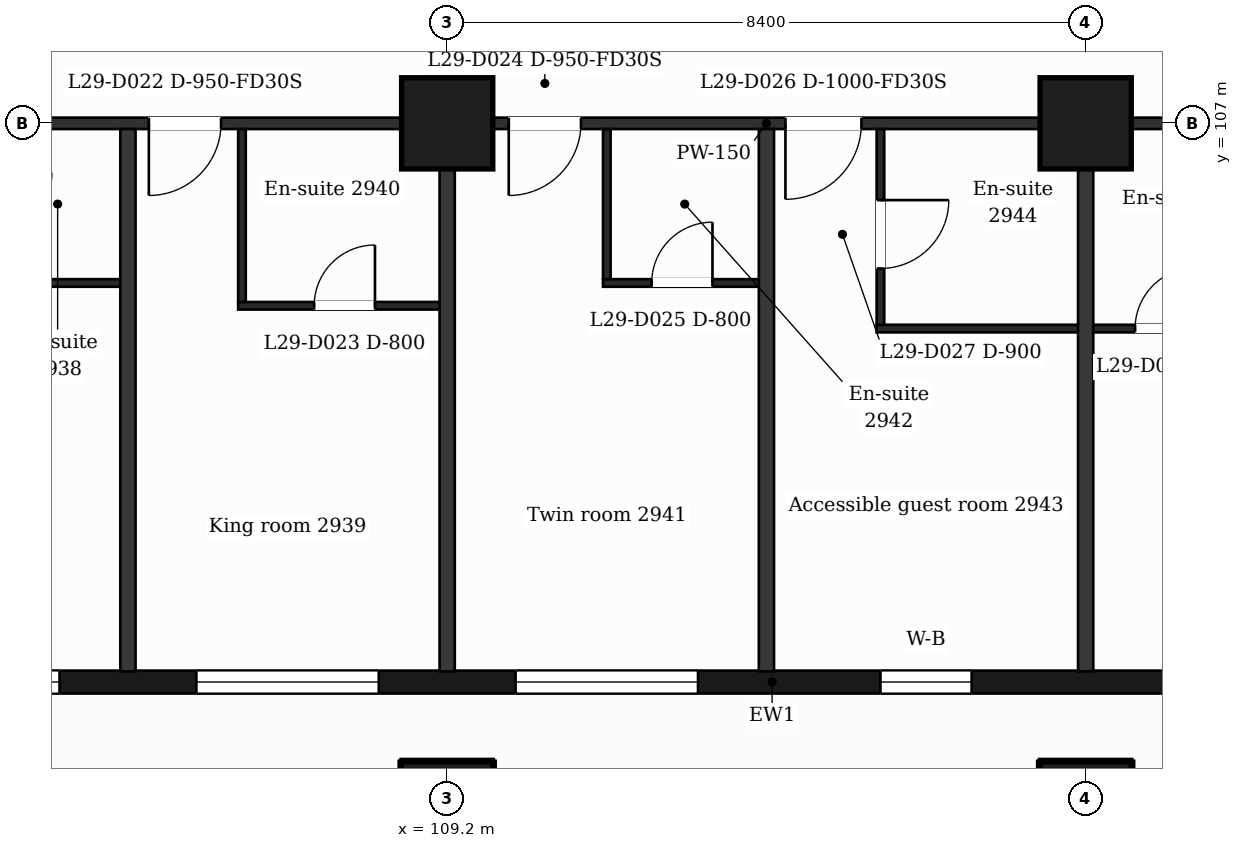
"""IFC4 building model, lengths in metres.
Left out: names, types, materials, properties, quantities, classifications, styles, units other than length and angle.
Written with IfcOpenShell. Run it as: python <this file> out.ifc"""

import sys

from ifc_helpers import new_model, si_unit, direction, frame, frame_2d, origin, origin_2d, place, context, subcontext, project, spatial, rectangle, extrude, element, fill, save


model = new_model("IFC4")
c1 = context("Model", 3, precision=1e-05, world=origin(), true_north=direction((0.0, 1.0)))
c2 = subcontext(c1, "Body", "Model", "MODEL_VIEW")
j1 = project(units=[si_unit("LENGTHUNIT", "METRE"), si_unit("PLANEANGLEUNIT", "RADIAN")], contexts=[c1])
p1 = place(None, origin())
s1 = spatial("IfcSite", under=j1, at=p1, CompositionType="ELEMENT")
p2 = place(p1, origin())
s2 = spatial("IfcBuilding", under=s1, at=p2, CompositionType="ELEMENT")
p3 = place(p2, frame((0.0, 0.0, 124.3)))
s3 = spatial("IfcBuildingStorey", under=s2, at=p3, CompositionType="ELEMENT", Elevation=124.3)
for number, where, z_axis, x_axis in (
    (1, (109.2, 98.0, 0.0), (0.0, 0.0, 1.0), (1.0, 0.0, 0.0)),
    (2, (117.6, 98.0, 0.0), (0.0, 0.0, 1.0), (1.0, 0.0, 0.0)),
    (3, (109.2, 107.0, 0.0), (0.0, 0.0, 1.0), (1.0, 0.0, 0.0)),
    (4, (117.6, 107.0, 0.0), (0.0, 0.0, 1.0), (1.0, 0.0, 0.0)),
):
    element("IfcColumn", number, at=place(p3, frame(where, z_axis=z_axis, x_axis=x_axis)), inside=s3, PredefinedType="COLUMN", context=c2, shape_type="SweptSolid", body=[
        extrude(rectangle(XDim=1.2, YDim=1.2, at=origin_2d()), origin(), (0.0, 0.0, 1.0), 3.7),
    ])
p4 = place(p3, frame((89.85, 99.65, 0.0), z_axis=(0.0, 0.0, 1.0), x_axis=(1.0, 0.0, 0.0)))
e5 = element("IfcWall", 5, at=p4, inside=s3, PredefinedType="SOLIDWALL", context=c2, shape_type="SweptSolid", body=[
    extrude(rectangle(XDim=47.25, YDim=0.3, at=frame_2d((23.625, 0.0))), origin(), (0.0, 0.0, 1.0), 3.38),
])
p5 = place(p4, frame((0.725, 0.0, 0.9)))
e6 = element("IfcOpeningElement", 6, at=p5, cuts=e5, PredefinedType="OPENING", context=c2, shape_type="SweptSolid", body=[
    extrude(rectangle(XDim=1.2, YDim=2.1, at=frame_2d((0.6, 1.05))), frame((0.0, 0.16, 0.0), z_axis=(0.0, -1.0, 0.0), x_axis=(1.0, 0.0, 0.0)), (0.0, 0.0, 1.0), 0.32),
])
p6 = place(p4, frame((3.45, 0.0, 0.9)))
e7 = element("IfcOpeningElement", 7, at=p6, cuts=e5, PredefinedType="OPENING", context=c2, shape_type="SweptSolid", body=[
    extrude(rectangle(XDim=2.4, YDim=2.1, at=frame_2d((1.2, 1.05))), frame((0.0, 0.16, 0.0), z_axis=(0.0, -1.0, 0.0), x_axis=(1.0, 0.0, 0.0)), (0.0, 0.0, 1.0), 0.32),
])
p7 = place(p4, frame((7.65, 0.0, 0.9)))
e8 = element("IfcOpeningElement", 8, at=p7, cuts=e5, PredefinedType="OPENING", context=c2, shape_type="SweptSolid", body=[
    extrude(rectangle(XDim=2.4, YDim=2.1, at=frame_2d((1.2, 1.05))), frame((0.0, 0.16, 0.0), z_axis=(0.0, -1.0, 0.0), x_axis=(1.0, 0.0, 0.0)), (0.0, 0.0, 1.0), 0.32),
])
p8 = place(p4, frame((11.85, 0.0, 0.9)))
e9 = element("IfcOpeningElement", 9, at=p8, cuts=e5, PredefinedType="OPENING", context=c2, shape_type="SweptSolid", body=[
    extrude(rectangle(XDim=2.4, YDim=2.1, at=frame_2d((1.2, 1.05))), frame((0.0, 0.16, 0.0), z_axis=(0.0, -1.0, 0.0), x_axis=(1.0, 0.0, 0.0)), (0.0, 0.0, 1.0), 0.32),
])
p9 = place(p4, frame((16.05, 0.0, 0.9)))
e10 = element("IfcOpeningElement", 10, at=p9, cuts=e5, PredefinedType="OPENING", context=c2, shape_type="SweptSolid", body=[
    extrude(rectangle(XDim=2.4, YDim=2.1, at=frame_2d((1.2, 1.05))), frame((0.0, 0.16, 0.0), z_axis=(0.0, -1.0, 0.0), x_axis=(1.0, 0.0, 0.0)), (0.0, 0.0, 1.0), 0.32),
])
p10 = place(p4, frame((20.25, 0.0, 0.9)))
e11 = element("IfcOpeningElement", 11, at=p10, cuts=e5, PredefinedType="OPENING", context=c2, shape_type="SweptSolid", body=[
    extrude(rectangle(XDim=2.4, YDim=2.1, at=frame_2d((1.2, 1.05))), frame((0.0, 0.16, 0.0), z_axis=(0.0, -1.0, 0.0), x_axis=(1.0, 0.0, 0.0)), (0.0, 0.0, 1.0), 0.32),
])
p11 = place(p4, frame((25.05, 0.0, 0.9)))
e12 = element("IfcOpeningElement", 12, at=p11, cuts=e5, PredefinedType="OPENING", context=c2, shape_type="SweptSolid", body=[
    extrude(rectangle(XDim=1.2, YDim=2.1, at=frame_2d((0.6, 1.05))), frame((0.0, 0.16, 0.0), z_axis=(0.0, -1.0, 0.0), x_axis=(1.0, 0.0, 0.0)), (0.0, 0.0, 1.0), 0.32),
])
p12 = place(p4, frame((29.25, 0.0, 0.9)))
e13 = element("IfcOpeningElement", 13, at=p12, cuts=e5, PredefinedType="OPENING", context=c2, shape_type="SweptSolid", body=[
    extrude(rectangle(XDim=1.2, YDim=2.1, at=frame_2d((0.6, 1.05))), frame((0.0, 0.16, 0.0), z_axis=(0.0, -1.0, 0.0), x_axis=(1.0, 0.0, 0.0)), (0.0, 0.0, 1.0), 0.32),
])
p13 = place(p4, frame((32.55, 0.0, 0.0)))
e14 = element("IfcOpeningElement", 14, at=p13, cuts=e5, PredefinedType="OPENING", context=c2, shape_type="SweptSolid", body=[
    extrude(rectangle(XDim=1.2, YDim=2.4, at=frame_2d((0.6, 1.2))), frame((0.0, 0.16, 0.0), z_axis=(0.0, -1.0, 0.0), x_axis=(1.0, 0.0, 0.0)), (0.0, 0.0, 1.0), 0.32),
])
p14 = place(p4, frame((34.35, 0.0, 0.9)))
e15 = element("IfcOpeningElement", 15, at=p14, cuts=e5, PredefinedType="OPENING", context=c2, shape_type="SweptSolid", body=[
    extrude(rectangle(XDim=1.2, YDim=2.1, at=frame_2d((0.6, 1.05))), frame((0.0, 0.16, 0.0), z_axis=(0.0, -1.0, 0.0), x_axis=(1.0, 0.0, 0.0)), (0.0, 0.0, 1.0), 0.32),
])
p15 = place(p4, frame((37.05, 0.0, 0.9)))
e16 = element("IfcOpeningElement", 16, at=p15, cuts=e5, PredefinedType="OPENING", context=c2, shape_type="SweptSolid", body=[
    extrude(rectangle(XDim=2.4, YDim=2.1, at=frame_2d((1.2, 1.05))), frame((0.0, 0.16, 0.0), z_axis=(0.0, -1.0, 0.0), x_axis=(1.0, 0.0, 0.0)), (0.0, 0.0, 1.0), 0.32),
])
p16 = place(p4, frame((40.95, 0.0, 0.0)))
e17 = element("IfcOpeningElement", 17, at=p16, cuts=e5, PredefinedType="OPENING", context=c2, shape_type="SweptSolid", body=[
    extrude(rectangle(XDim=1.2, YDim=2.4, at=frame_2d((0.6, 1.2))), frame((0.0, 0.16, 0.0), z_axis=(0.0, -1.0, 0.0), x_axis=(1.0, 0.0, 0.0)), (0.0, 0.0, 1.0), 0.32),
])
p17 = place(p4, frame((42.75, 0.0, 0.9)))
e18 = element("IfcOpeningElement", 18, at=p17, cuts=e5, PredefinedType="OPENING", context=c2, shape_type="SweptSolid", body=[
    extrude(rectangle(XDim=1.2, YDim=2.1, at=frame_2d((0.6, 1.05))), frame((0.0, 0.16, 0.0), z_axis=(0.0, -1.0, 0.0), x_axis=(1.0, 0.0, 0.0)), (0.0, 0.0, 1.0), 0.32),
])
p18 = place(p4, frame((45.25, 0.0, 0.9)))
e19 = element("IfcOpeningElement", 19, at=p18, cuts=e5, PredefinedType="OPENING", context=c2, shape_type="SweptSolid", body=[
    extrude(rectangle(XDim=1.2, YDim=2.1, at=frame_2d((0.6, 1.05))), frame((0.0, 0.16, 0.0), z_axis=(0.0, -1.0, 0.0), x_axis=(1.0, 0.0, 0.0)), (0.0, 0.0, 1.0), 0.32),
])
p19 = place(p3, frame((114.85, 104.3, 0.0), z_axis=(0.0, 0.0, 1.0), x_axis=(1.0, 0.0, 0.0)))
e20 = element("IfcWall", 20, at=p19, inside=s3, PredefinedType="PARTITIONING", context=c2, shape_type="SweptSolid", body=[
    extrude(rectangle(XDim=5.5, YDim=0.1, at=frame_2d((2.75, 0.0))), origin(), (0.0, 0.0, 1.0), 3.38),
])
p20 = place(p19, frame((3.4, 0.0, 0.0)))
e21 = element("IfcOpeningElement", 21, at=p20, cuts=e20, PredefinedType="OPENING", context=c2, shape_type="SweptSolid", body=[
    extrude(rectangle(XDim=0.8, YDim=2.1, at=frame_2d((0.4, 1.05))), frame((0.0, 0.06, 0.0), z_axis=(0.0, -1.0, 0.0), x_axis=(1.0, 0.0, 0.0)), (0.0, 0.0, 1.0), 0.12),
])
p21 = place(p3, frame((106.45, 104.6, 0.0), z_axis=(0.0, 0.0, 1.0), x_axis=(1.0, 0.0, 0.0)))
e22 = element("IfcWall", 22, at=p21, inside=s3, PredefinedType="PARTITIONING", context=c2, shape_type="SweptSolid", body=[
    extrude(rectangle(XDim=2.75, YDim=0.1, at=frame_2d((1.375, 0.0))), origin(), (0.0, 0.0, 1.0), 3.38),
])
p22 = place(p21, frame((1.0, 0.0, 0.0)))
e23 = element("IfcOpeningElement", 23, at=p22, cuts=e22, PredefinedType="OPENING", context=c2, shape_type="SweptSolid", body=[
    extrude(rectangle(XDim=0.8, YDim=2.1, at=frame_2d((0.4, 1.05))), frame((0.0, 0.06, 0.0), z_axis=(0.0, -1.0, 0.0), x_axis=(1.0, 0.0, 0.0)), (0.0, 0.0, 1.0), 0.12),
])
p23 = place(p3, frame((103.15, 104.9, 0.0), z_axis=(0.0, 0.0, 1.0), x_axis=(1.0, 0.0, 0.0)))
e24 = element("IfcWall", 24, at=p23, inside=s3, PredefinedType="PARTITIONING", context=c2, shape_type="SweptSolid", body=[
    extrude(rectangle(XDim=1.85, YDim=0.1, at=frame_2d((0.925, 0.0))), origin(), (0.0, 0.0, 1.0), 3.38),
])
p24 = place(p3, frame((111.25, 104.9, 0.0), z_axis=(0.0, 0.0, 1.0), x_axis=(1.0, 0.0, 0.0)))
e25 = element("IfcWall", 25, at=p24, inside=s3, PredefinedType="PARTITIONING", context=c2, shape_type="SweptSolid", body=[
    extrude(rectangle(XDim=2.15, YDim=0.1, at=frame_2d((1.075, 0.0))), origin(), (0.0, 0.0, 1.0), 3.38),
])
p25 = place(p24, frame((0.64, 0.0, 0.0)))
e26 = element("IfcOpeningElement", 26, at=p25, cuts=e25, PredefinedType="OPENING", context=c2, shape_type="SweptSolid", body=[
    extrude(rectangle(XDim=0.8, YDim=2.1, at=frame_2d((0.4, 1.05))), frame((0.0, 0.06, 0.0), z_axis=(0.0, -1.0, 0.0), x_axis=(1.0, 0.0, 0.0)), (0.0, 0.0, 1.0), 0.12),
])
p26 = place(p3, frame((87.018, 107.0, 0.0), z_axis=(0.0, 0.0, 1.0), x_axis=(1.0, 0.0, 0.0)))
e27 = element("IfcWall", 27, at=p26, inside=s3, PredefinedType="PARTITIONING", context=c2, shape_type="SweptSolid", body=[
    extrude(rectangle(XDim=52.765, YDim=0.15, at=frame_2d((26.382, 0.0))), origin(), (0.0, 0.0, 1.0), 3.38),
])
p27 = place(p26, frame((1.276, 0.0, 0.0)))
e28 = element("IfcOpeningElement", 28, at=p27, cuts=e27, PredefinedType="OPENING", context=c2, shape_type="SweptSolid", body=[
    extrude(rectangle(XDim=0.95, YDim=2.1, at=frame_2d((0.475, 1.05))), frame((0.0, 0.085, 0.0), z_axis=(0.0, -1.0, 0.0), x_axis=(1.0, 0.0, 0.0)), (0.0, 0.0, 1.0), 0.17),
])
p28 = place(p26, frame((6.192, 0.0, 0.0)))
e29 = element("IfcOpeningElement", 29, at=p28, cuts=e27, PredefinedType="OPENING", context=c2, shape_type="SweptSolid", body=[
    extrude(rectangle(XDim=0.95, YDim=2.1, at=frame_2d((0.475, 1.05))), frame((0.0, 0.085, 0.0), z_axis=(0.0, -1.0, 0.0), x_axis=(1.0, 0.0, 0.0)), (0.0, 0.0, 1.0), 0.17),
])
p29 = place(p26, frame((11.982, 0.0, 0.0)))
e30 = element("IfcOpeningElement", 30, at=p29, cuts=e27, PredefinedType="OPENING", context=c2, shape_type="SweptSolid", body=[
    extrude(rectangle(XDim=1.0, YDim=2.1, at=frame_2d((0.5, 1.05))), frame((0.0, 0.085, 0.0), z_axis=(0.0, -1.0, 0.0), x_axis=(1.0, 0.0, 0.0)), (0.0, 0.0, 1.0), 0.17),
])
p30 = place(p26, frame((14.582, 0.0, 0.0)))
e31 = element("IfcOpeningElement", 31, at=p30, cuts=e27, PredefinedType="OPENING", context=c2, shape_type="SweptSolid", body=[
    extrude(rectangle(XDim=0.95, YDim=2.1, at=frame_2d((0.475, 1.05))), frame((0.0, 0.085, 0.0), z_axis=(0.0, -1.0, 0.0), x_axis=(1.0, 0.0, 0.0)), (0.0, 0.0, 1.0), 0.17),
])
p31 = place(p26, frame((18.257, 0.0, 0.0)))
e32 = element("IfcOpeningElement", 32, at=p31, cuts=e27, PredefinedType="OPENING", context=c2, shape_type="SweptSolid", body=[
    extrude(rectangle(XDim=0.95, YDim=2.1, at=frame_2d((0.475, 1.05))), frame((0.0, 0.085, 0.0), z_axis=(0.0, -1.0, 0.0), x_axis=(1.0, 0.0, 0.0)), (0.0, 0.0, 1.0), 0.17),
])
p32 = place(p26, frame((22.992, 0.0, 0.0)))
e33 = element("IfcOpeningElement", 33, at=p32, cuts=e27, PredefinedType="OPENING", context=c2, shape_type="SweptSolid", body=[
    extrude(rectangle(XDim=0.95, YDim=2.1, at=frame_2d((0.475, 1.05))), frame((0.0, 0.085, 0.0), z_axis=(0.0, -1.0, 0.0), x_axis=(1.0, 0.0, 0.0)), (0.0, 0.0, 1.0), 0.17),
])
p33 = place(p26, frame((26.632, 0.0, 0.0)))
e34 = element("IfcOpeningElement", 34, at=p33, cuts=e27, PredefinedType="OPENING", context=c2, shape_type="SweptSolid", body=[
    extrude(rectangle(XDim=1.0, YDim=2.1, at=frame_2d((0.5, 1.05))), frame((0.0, 0.085, 0.0), z_axis=(0.0, -1.0, 0.0), x_axis=(1.0, 0.0, 0.0)), (0.0, 0.0, 1.0), 0.17),
])
p34 = place(p26, frame((33.557, 0.0, 0.0)))
e35 = element("IfcOpeningElement", 35, at=p34, cuts=e27, PredefinedType="OPENING", context=c2, shape_type="SweptSolid", body=[
    extrude(rectangle(XDim=0.95, YDim=2.1, at=frame_2d((0.475, 1.05))), frame((0.0, 0.085, 0.0), z_axis=(0.0, -1.0, 0.0), x_axis=(1.0, 0.0, 0.0)), (0.0, 0.0, 1.0), 0.17),
])
p35 = place(p26, frame((37.182, 0.0, 0.0)))
e36 = element("IfcOpeningElement", 36, at=p35, cuts=e27, PredefinedType="OPENING", context=c2, shape_type="SweptSolid", body=[
    extrude(rectangle(XDim=0.95, YDim=2.1, at=frame_2d((0.475, 1.05))), frame((0.0, 0.085, 0.0), z_axis=(0.0, -1.0, 0.0), x_axis=(1.0, 0.0, 0.0)), (0.0, 0.0, 1.0), 0.17),
])
p36 = place(p26, frame((41.957, 0.0, 0.0)))
e37 = element("IfcOpeningElement", 37, at=p36, cuts=e27, PredefinedType="OPENING", context=c2, shape_type="SweptSolid", body=[
    extrude(rectangle(XDim=0.95, YDim=2.1, at=frame_2d((0.475, 1.05))), frame((0.0, 0.085, 0.0), z_axis=(0.0, -1.0, 0.0), x_axis=(1.0, 0.0, 0.0)), (0.0, 0.0, 1.0), 0.17),
])
p37 = place(p26, frame((45.622, 0.0, 0.0)))
e38 = element("IfcOpeningElement", 38, at=p37, cuts=e27, PredefinedType="OPENING", context=c2, shape_type="SweptSolid", body=[
    extrude(rectangle(XDim=0.95, YDim=2.1, at=frame_2d((0.475, 1.05))), frame((0.0, 0.085, 0.0), z_axis=(0.0, -1.0, 0.0), x_axis=(1.0, 0.0, 0.0)), (0.0, 0.0, 1.0), 0.17),
])
p38 = place(p26, frame((48.56, 0.0, 0.0)))
e39 = element("IfcOpeningElement", 39, at=p38, cuts=e27, PredefinedType="OPENING", context=c2, shape_type="SweptSolid", body=[
    extrude(rectangle(XDim=0.95, YDim=2.1, at=frame_2d((0.475, 1.05))), frame((0.0, 0.085, 0.0), z_axis=(0.0, -1.0, 0.0), x_axis=(1.0, 0.0, 0.0)), (0.0, 0.0, 1.0), 0.17),
])
p39 = place(p3, frame((105.0, 99.79, 0.0), z_axis=(0.0, 0.0, 1.0), x_axis=(0.0, 1.0, 0.0)))
e40 = element("IfcWall", 40, at=p39, inside=s3, PredefinedType="PARTITIONING", context=c2, shape_type="SweptSolid", body=[
    extrude(rectangle(XDim=7.135, YDim=0.2, at=frame_2d((3.567, 0.0))), origin(), (0.0, 0.0, 1.0), 3.38),
])
p40 = place(p3, frame((106.5, 104.65, 0.0), z_axis=(0.0, 0.0, 1.0), x_axis=(0.0, 1.0, 0.0)))
e41 = element("IfcWall", 41, at=p40, inside=s3, PredefinedType="PARTITIONING", context=c2, shape_type="SweptSolid", body=[
    extrude(rectangle(XDim=2.275, YDim=0.1, at=frame_2d((1.138, 0.0))), origin(), (0.0, 0.0, 1.0), 3.38),
])
p41 = place(p3, frame((109.2, 99.79, 0.0), z_axis=(0.0, 0.0, 1.0), x_axis=(0.0, 1.0, 0.0)))
e42 = element("IfcWall", 42, at=p41, inside=s3, PredefinedType="PARTITIONING", context=c2, shape_type="SweptSolid", body=[
    extrude(rectangle(XDim=7.135, YDim=0.2, at=frame_2d((3.567, 0.0))), origin(), (0.0, 0.0, 1.0), 3.38),
])
p42 = place(p3, frame((111.3, 104.95, 0.0), z_axis=(0.0, 0.0, 1.0), x_axis=(0.0, 1.0, 0.0)))
e43 = element("IfcWall", 43, at=p42, inside=s3, PredefinedType="PARTITIONING", context=c2, shape_type="SweptSolid", body=[
    extrude(rectangle(XDim=1.975, YDim=0.1, at=frame_2d((0.988, 0.0))), origin(), (0.0, 0.0, 1.0), 3.38),
])
p43 = place(p3, frame((113.4, 99.79, 0.0), z_axis=(0.0, 0.0, 1.0), x_axis=(0.0, 1.0, 0.0)))
e44 = element("IfcWall", 44, at=p43, inside=s3, PredefinedType="PARTITIONING", context=c2, shape_type="SweptSolid", body=[
    extrude(rectangle(XDim=7.135, YDim=0.2, at=frame_2d((3.567, 0.0))), origin(), (0.0, 0.0, 1.0), 3.38),
])
p44 = place(p3, frame((114.9, 104.35, 0.0), z_axis=(0.0, 0.0, 1.0), x_axis=(0.0, 1.0, 0.0)))
e45 = element("IfcWall", 45, at=p44, inside=s3, PredefinedType="PARTITIONING", context=c2, shape_type="SweptSolid", body=[
    extrude(rectangle(XDim=2.575, YDim=0.1, at=frame_2d((1.288, 0.0))), origin(), (0.0, 0.0, 1.0), 3.38),
])
p45 = place(p44, frame((0.74, 0.0, 0.0)))
e46 = element("IfcOpeningElement", 46, at=p45, cuts=e45, PredefinedType="OPENING", context=c2, shape_type="SweptSolid", body=[
    extrude(rectangle(XDim=0.9, YDim=2.1, at=frame_2d((0.45, 1.05))), frame((0.0, 0.06, 0.0), z_axis=(0.0, -1.0, 0.0), x_axis=(1.0, 0.0, 0.0)), (0.0, 0.0, 1.0), 0.12),
])
p46 = place(p3, frame((117.6, 99.79, 0.0), z_axis=(0.0, 0.0, 1.0), x_axis=(0.0, 1.0, 0.0)))
e47 = element("IfcWall", 47, at=p46, inside=s3, PredefinedType="PARTITIONING", context=c2, shape_type="SweptSolid", body=[
    extrude(rectangle(XDim=7.135, YDim=0.2, at=frame_2d((3.567, 0.0))), origin(), (0.0, 0.0, 1.0), 3.38),
])
p47 = place(p8, origin())
e48 = element("IfcWindow", 48, at=p47, inside=s3, PartitioningType="SINGLE_PANEL", PredefinedType="WINDOW", context=c2, shape_type="SweptSolid", body=[
    extrude(rectangle(XDim=2.4, YDim=2.1, at=frame_2d((1.2, 1.05))), frame((0.0, 0.03, 0.0), z_axis=(0.0, -1.0, 0.0), x_axis=(1.0, 0.0, 0.0)), (0.0, 0.0, 1.0), 0.06),
])
fill(e9, e48)
p48 = place(p9, origin())
e49 = element("IfcWindow", 49, at=p48, inside=s3, PartitioningType="SINGLE_PANEL", PredefinedType="WINDOW", context=c2, shape_type="SweptSolid", body=[
    extrude(rectangle(XDim=2.4, YDim=2.1, at=frame_2d((1.2, 1.05))), frame((0.0, 0.03, 0.0), z_axis=(0.0, -1.0, 0.0), x_axis=(1.0, 0.0, 0.0)), (0.0, 0.0, 1.0), 0.06),
])
fill(e10, e49)
p49 = place(p10, origin())
e50 = element("IfcWindow", 50, at=p49, inside=s3, PartitioningType="SINGLE_PANEL", PredefinedType="WINDOW", context=c2, shape_type="SweptSolid", body=[
    extrude(rectangle(XDim=2.4, YDim=2.1, at=frame_2d((1.2, 1.05))), frame((0.0, 0.03, 0.0), z_axis=(0.0, -1.0, 0.0), x_axis=(1.0, 0.0, 0.0)), (0.0, 0.0, 1.0), 0.06),
])
fill(e11, e50)
p50 = place(p11, origin())
e51 = element("IfcWindow", 51, at=p50, inside=s3, PartitioningType="SINGLE_PANEL", PredefinedType="WINDOW", context=c2, shape_type="SweptSolid", body=[
    extrude(rectangle(XDim=1.2, YDim=2.1, at=frame_2d((0.6, 1.05))), frame((0.0, 0.03, 0.0), z_axis=(0.0, -1.0, 0.0), x_axis=(1.0, 0.0, 0.0)), (0.0, 0.0, 1.0), 0.06),
])
fill(e12, e51)
p51 = place(p31, origin())
e52 = element("IfcDoor", 52, at=p51, inside=s3, OperationType="SINGLE_SWING_LEFT", PredefinedType="DOOR", context=c2, shape_type="SweptSolid", body=[
    extrude(rectangle(XDim=0.95, YDim=2.1, at=frame_2d((0.475, 1.05))), frame((0.0, 0.025, 0.0), z_axis=(0.0, -1.0, 0.0), x_axis=(1.0, 0.0, 0.0)), (0.0, 0.0, 1.0), 0.05),
])
fill(e32, e52)
p52 = place(p22, origin())
e53 = element("IfcDoor", 53, at=p52, inside=s3, OperationType="SINGLE_SWING_RIGHT", PredefinedType="DOOR", context=c2, shape_type="SweptSolid", body=[
    extrude(rectangle(XDim=0.8, YDim=2.1, at=frame_2d((0.4, 1.05))), frame((0.0, 0.025, 0.0), z_axis=(0.0, -1.0, 0.0), x_axis=(1.0, 0.0, 0.0)), (0.0, 0.0, 1.0), 0.05),
])
fill(e23, e53)
p53 = place(p32, origin())
e54 = element("IfcDoor", 54, at=p53, inside=s3, OperationType="SINGLE_SWING_LEFT", PredefinedType="DOOR", context=c2, shape_type="SweptSolid", body=[
    extrude(rectangle(XDim=0.95, YDim=2.1, at=frame_2d((0.475, 1.05))), frame((0.0, 0.025, 0.0), z_axis=(0.0, -1.0, 0.0), x_axis=(1.0, 0.0, 0.0)), (0.0, 0.0, 1.0), 0.05),
])
fill(e33, e54)
p54 = place(p25, origin())
e55 = element("IfcDoor", 55, at=p54, inside=s3, OperationType="SINGLE_SWING_RIGHT", PredefinedType="DOOR", context=c2, shape_type="SweptSolid", body=[
    extrude(rectangle(XDim=0.8, YDim=2.1, at=frame_2d((0.4, 1.05))), frame((0.0, 0.025, 0.0), z_axis=(0.0, -1.0, 0.0), x_axis=(1.0, 0.0, 0.0)), (0.0, 0.0, 1.0), 0.05),
])
fill(e26, e55)
p55 = place(p33, origin())
e56 = element("IfcDoor", 56, at=p55, inside=s3, OperationType="SINGLE_SWING_LEFT", PredefinedType="DOOR", context=c2, shape_type="SweptSolid", body=[
    extrude(rectangle(XDim=1.0, YDim=2.1, at=frame_2d((0.5, 1.05))), frame((0.0, 0.025, 0.0), z_axis=(0.0, -1.0, 0.0), x_axis=(1.0, 0.0, 0.0)), (0.0, 0.0, 1.0), 0.05),
])
fill(e34, e56)
p56 = place(p45, origin())
e57 = element("IfcDoor", 57, at=p56, inside=s3, OperationType="SINGLE_SWING_RIGHT", PredefinedType="DOOR", context=c2, shape_type="SweptSolid", body=[
    extrude(rectangle(XDim=0.9, YDim=2.1, at=frame_2d((0.45, 1.05))), frame((0.0, 0.025, 0.0), z_axis=(0.0, -1.0, 0.0), x_axis=(1.0, 0.0, 0.0)), (0.0, 0.0, 1.0), 0.05),
])
fill(e46, e57)
p57 = place(p20, origin())
e58 = element("IfcDoor", 58, at=p57, inside=s3, OperationType="SINGLE_SWING_RIGHT", PredefinedType="DOOR", context=c2, shape_type="SweptSolid", body=[
    extrude(rectangle(XDim=0.8, YDim=2.1, at=frame_2d((0.4, 1.05))), frame((0.0, 0.025, 0.0), z_axis=(0.0, -1.0, 0.0), x_axis=(1.0, 0.0, 0.0)), (0.0, 0.0, 1.0), 0.05),
])
fill(e21, e58)
save(model, sys.argv[1])
